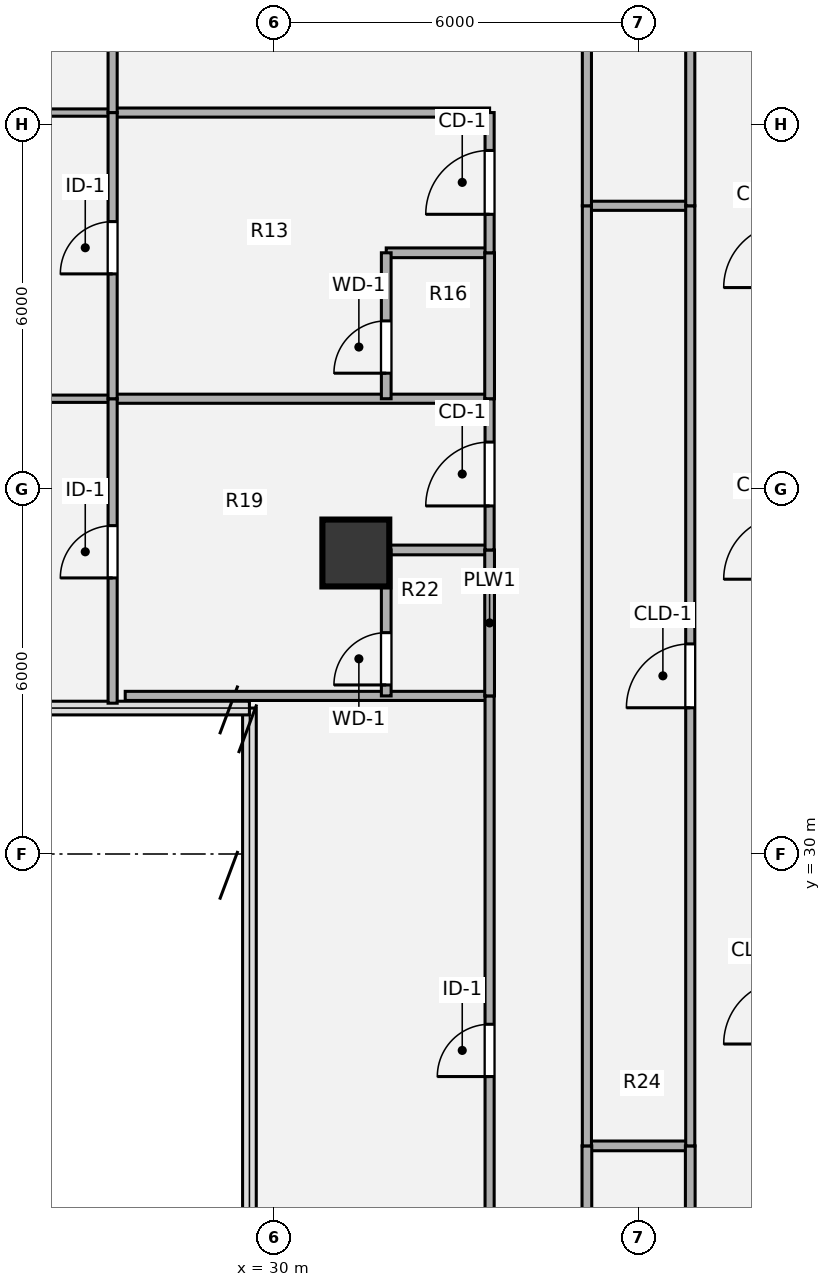
"""IFC4 building model, lengths in metres.
Left out: names, types, materials, properties, quantities, classifications, styles, units other than length and angle.
Written with IfcOpenShell. Run it as: python <this file> out.ifc"""

import sys

from ifc_helpers import new_model, si_unit, direction, frame, frame_2d, origin, origin_2d, place, context, subcontext, project, spatial, rectangle, hollow_circle, extrude, source, transform, mapped, element, fill, save


model = new_model("IFC4")
c1 = context("Model", 3, precision=1e-05, world=origin(), true_north=direction((0.0, 1.0)))
c2 = subcontext(c1, "Body", "Model", "MODEL_VIEW")
j1 = project(units=[si_unit("LENGTHUNIT", "METRE"), si_unit("PLANEANGLEUNIT", "RADIAN")], contexts=[c1])
p1 = place(None, origin())
s1 = spatial("IfcSite", under=j1, at=p1, CompositionType="ELEMENT")
p2 = place(p1, origin())
s2 = spatial("IfcBuilding", under=s1, at=p2, CompositionType="ELEMENT")
p3 = place(p2, frame((0.0, 0.0, 198.0)))
s3 = spatial("IfcBuildingStorey", under=s2, at=p3, CompositionType="ELEMENT", Elevation=198.0)
m1 = source(origin(), c2, "Body", "SweptSolid", [
    extrude(hollow_circle(Radius=0.55, WallThickness=0.04, at=origin_2d()), origin(), (0.0, 0.0, 1.0), 3.78),
])
p4 = place(p3, frame((31.35, 34.95, 0.0), z_axis=(0.0, 0.0, 1.0), x_axis=(1.0, 0.0, 0.0)))
e1 = element("IfcColumn", 1, at=p4, inside=s3, PredefinedType="COLUMN", context=c2, shape_type="MappedRepresentation", body=[
    mapped(m1, transform((0.0, 0.0, 0.0), x_axis=(1.0, 0.0, 0.0), y_axis=(0.0, 1.0, 0.0), z_axis=(0.0, 0.0, 1.0), scale=1.0)),
])
p5 = place(p3, frame((35.15, 25.2, 0.0), z_axis=(0.0, 0.0, 1.0), x_axis=(1.0, 0.0, 0.0)))
e2 = element("IfcWall", 2, at=p5, inside=s3, PredefinedType="PLUMBINGWALL", context=c2, shape_type="SweptSolid", body=[
    extrude(rectangle(XDim=1.7, YDim=0.16, at=frame_2d((0.85, 0.0))), origin(), (0.0, 0.0, 1.0), 3.5),
])
p6 = place(p3, frame((27.557, 32.6, 0.0), z_axis=(0.0, 0.0, 1.0), x_axis=(1.0, 0.0, 0.0)))
e3 = element("IfcWall", 3, at=p6, inside=s3, PredefinedType="PARTITIONING", context=c2, shape_type="SweptSolid", body=[
    extrude(rectangle(XDim=5.993, YDim=0.15, at=frame_2d((2.997, 0.0))), origin(), (0.0, 0.0, 1.0), 3.5),
])
p7 = place(p3, frame((31.85, 35.0, 0.0), z_axis=(0.0, 0.0, 1.0), x_axis=(1.0, 0.0, 0.0)))
e4 = element("IfcWall", 4, at=p7, inside=s3, PredefinedType="PLUMBINGWALL", context=c2, shape_type="SweptSolid", body=[
    extrude(rectangle(XDim=1.7, YDim=0.16, at=frame_2d((0.85, 0.0))), origin(), (0.0, 0.0, 1.0), 2.903),
])
p8 = place(p3, frame((15.88, 37.487, 0.0), z_axis=(0.0, 0.0, 1.0), x_axis=(1.0, 0.0, 0.0)))
e5 = element("IfcWall", 5, at=p8, inside=s3, PredefinedType="PARTITIONING", context=c2, shape_type="SweptSolid", body=[
    extrude(rectangle(XDim=11.47, YDim=0.12, at=frame_2d((5.735, 0.0))), origin(), (0.0, 0.0, 1.0), 3.055),
])
p9 = place(p3, frame((27.35, 37.487, 0.0), z_axis=(0.0, 0.0, 1.0), x_axis=(1.0, 0.0, 0.0)))
e6 = element("IfcWall", 6, at=p9, inside=s3, PredefinedType="PARTITIONING", context=c2, shape_type="SweptSolid", body=[
    extrude(rectangle(XDim=6.2, YDim=0.15, at=frame_2d((3.1, 0.0))), origin(), (0.0, 0.0, 1.0), 3.055),
])
p10 = place(p3, frame((31.85, 39.887, 0.0), z_axis=(0.0, 0.0, 1.0), x_axis=(1.0, 0.0, 0.0)))
e7 = element("IfcWall", 7, at=p10, inside=s3, PredefinedType="PLUMBINGWALL", context=c2, shape_type="SweptSolid", body=[
    extrude(rectangle(XDim=1.7, YDim=0.16, at=frame_2d((0.85, 0.0))), origin(), (0.0, 0.0, 1.0), 3.259),
])
p11 = place(p3, frame((35.15, 40.66, 0.0), z_axis=(0.0, 0.0, 1.0), x_axis=(1.0, 0.0, 0.0)))
e8 = element("IfcWall", 8, at=p11, inside=s3, PredefinedType="PARTITIONING", context=c2, shape_type="SweptSolid", body=[
    extrude(rectangle(XDim=1.7, YDim=0.15, at=frame_2d((0.85, 0.0))), origin(), (0.0, 0.0, 1.0), 3.259),
])
p12 = place(p3, frame((15.88, 42.193, 0.0), z_axis=(0.0, 0.0, 1.0), x_axis=(1.0, 0.0, 0.0)))
e9 = element("IfcWall", 9, at=p12, inside=s3, PredefinedType="PARTITIONING", context=c2, shape_type="SweptSolid", body=[
    extrude(rectangle(XDim=11.47, YDim=0.12, at=frame_2d((5.735, 0.0))), origin(), (0.0, 0.0, 1.0), 2.982),
])
p13 = place(p3, frame((27.35, 42.193, 0.0), z_axis=(0.0, 0.0, 1.0), x_axis=(1.0, 0.0, 0.0)))
e10 = element("IfcWall", 10, at=p13, inside=s3, PredefinedType="PARTITIONING", context=c2, shape_type="SweptSolid", body=[
    extrude(rectangle(XDim=6.2, YDim=0.15, at=frame_2d((3.1, 0.0))), origin(), (0.0, 0.0, 1.0), 2.982),
])
p14 = place(p3, frame((27.35, 32.48, 0.0), z_axis=(0.0, 0.0, 1.0), x_axis=(0.0, 1.0, 0.0)))
e11 = element("IfcWall", 11, at=p14, inside=s3, PredefinedType="PARTITIONING", context=c2, shape_type="SweptSolid", body=[
    extrude(rectangle(XDim=5.007, YDim=0.15, at=frame_2d((2.503, 0.0))), origin(), (0.0, 0.0, 1.0), 3.5),
])
p15 = place(p14, frame((2.06, 0.0, 0.0)))
e12 = element("IfcOpeningElement", 12, at=p15, cuts=e11, PredefinedType="OPENING", context=c2, shape_type="SweptSolid", body=[
    extrude(rectangle(XDim=0.86, YDim=2.1, at=origin_2d()), frame((0.43, 0.085, 1.05), z_axis=(0.0, -1.0, 0.0), x_axis=(1.0, 0.0, 0.0)), (0.0, 0.0, 1.0), 0.17),
])
p16 = place(p3, frame((27.35, 37.487, 0.0), z_axis=(0.0, 0.0, 1.0), x_axis=(0.0, 1.0, 0.0)))
e13 = element("IfcWall", 13, at=p16, inside=s3, PredefinedType="PARTITIONING", context=c2, shape_type="SweptSolid", body=[
    extrude(rectangle(XDim=4.706, YDim=0.15, at=frame_2d((2.353, 0.0))), origin(), (0.0, 0.0, 1.0), 3.5),
])
p17 = place(p16, frame((2.053, 0.0, 0.0)))
e14 = element("IfcOpeningElement", 14, at=p17, cuts=e13, PredefinedType="OPENING", context=c2, shape_type="SweptSolid", body=[
    extrude(rectangle(XDim=0.86, YDim=2.1, at=origin_2d()), frame((0.43, 0.085, 1.05), z_axis=(0.0, -1.0, 0.0), x_axis=(1.0, 0.0, 0.0)), (0.0, 0.0, 1.0), 0.17),
])
p18 = place(p3, frame((27.35, 42.193, 0.0), z_axis=(0.0, 0.0, 1.0), x_axis=(0.0, 1.0, 0.0)))
e15 = element("IfcWall", 15, at=p18, inside=s3, PredefinedType="PARTITIONING", context=c2, shape_type="SweptSolid", body=[
    extrude(rectangle(XDim=4.344, YDim=0.15, at=frame_2d((2.172, 0.0))), origin(), (0.0, 0.0, 1.0), 3.5),
])
p19 = place(p18, frame((1.847, 0.0, 0.0)))
e16 = element("IfcOpeningElement", 16, at=p19, cuts=e15, PredefinedType="OPENING", context=c2, shape_type="SweptSolid", body=[
    extrude(rectangle(XDim=0.86, YDim=2.1, at=origin_2d()), frame((0.43, 0.085, 1.05), z_axis=(0.0, -1.0, 0.0), x_axis=(1.0, 0.0, 0.0)), (0.0, 0.0, 1.0), 0.17),
])
p20 = place(p3, frame((31.85, 32.6, 0.0), z_axis=(0.0, 0.0, 1.0), x_axis=(0.0, 1.0, 0.0)))
e17 = element("IfcWall", 17, at=p20, inside=s3, PredefinedType="PLUMBINGWALL", context=c2, shape_type="SweptSolid", body=[
    extrude(rectangle(XDim=2.4, YDim=0.16, at=frame_2d((1.2, 0.0))), origin(), (0.0, 0.0, 1.0), 3.5),
])
p21 = place(p20, frame((0.18, 0.0, 0.0)))
e18 = element("IfcOpeningElement", 18, at=p21, cuts=e17, PredefinedType="OPENING", context=c2, shape_type="SweptSolid", body=[
    extrude(rectangle(XDim=0.86, YDim=2.1, at=origin_2d()), frame((0.43, 0.09, 1.05), z_axis=(0.0, -1.0, 0.0), x_axis=(1.0, 0.0, 0.0)), (0.0, 0.0, 1.0), 0.18),
])
p22 = place(p3, frame((31.85, 37.487, 0.0), z_axis=(0.0, 0.0, 1.0), x_axis=(0.0, 1.0, 0.0)))
e19 = element("IfcWall", 19, at=p22, inside=s3, PredefinedType="PLUMBINGWALL", context=c2, shape_type="SweptSolid", body=[
    extrude(rectangle(XDim=2.4, YDim=0.16, at=frame_2d((1.2, 0.0))), origin(), (0.0, 0.0, 1.0), 3.5),
])
p23 = place(p22, frame((0.42, 0.0, 0.0)))
e20 = element("IfcOpeningElement", 20, at=p23, cuts=e19, PredefinedType="OPENING", context=c2, shape_type="SweptSolid", body=[
    extrude(rectangle(XDim=0.86, YDim=2.1, at=origin_2d()), frame((0.43, 0.09, 1.05), z_axis=(0.0, -1.0, 0.0), x_axis=(1.0, 0.0, 0.0)), (0.0, 0.0, 1.0), 0.18),
])
p24 = place(p3, frame((33.55, 21.2, 0.0), z_axis=(0.0, 0.0, 1.0), x_axis=(0.0, 1.0, 0.0)))
e21 = element("IfcWall", 21, at=p24, inside=s3, PredefinedType="PARTITIONING", context=c2, shape_type="SweptSolid", body=[
    extrude(rectangle(XDim=11.4, YDim=0.15, at=frame_2d((5.7, 0.0))), origin(), (0.0, 0.0, 1.0), 3.5),
])
p25 = place(p24, frame((5.14, 0.0, 0.0)))
e22 = element("IfcOpeningElement", 22, at=p25, cuts=e21, PredefinedType="OPENING", context=c2, shape_type="SweptSolid", body=[
    extrude(rectangle(XDim=0.86, YDim=2.1, at=origin_2d()), frame((0.43, 0.085, 1.05), z_axis=(0.0, -1.0, 0.0), x_axis=(1.0, 0.0, 0.0)), (0.0, 0.0, 1.0), 0.17),
])
p26 = place(p3, frame((33.55, 32.6, 0.0), z_axis=(0.0, 0.0, 1.0), x_axis=(0.0, 1.0, 0.0)))
e23 = element("IfcWall", 23, at=p26, inside=s3, PredefinedType="PLUMBINGWALL", context=c2, shape_type="SweptSolid", body=[
    extrude(rectangle(XDim=2.4, YDim=0.16, at=frame_2d((1.2, 0.0))), origin(), (0.0, 0.0, 1.0), 3.5),
])
p27 = place(p3, frame((33.55, 35.0, 0.0), z_axis=(0.0, 0.0, 1.0), x_axis=(0.0, 1.0, 0.0)))
e24 = element("IfcWall", 24, at=p27, inside=s3, PredefinedType="PARTITIONING", context=c2, shape_type="SweptSolid", body=[
    extrude(rectangle(XDim=2.487, YDim=0.15, at=frame_2d((1.244, 0.0))), origin(), (0.0, 0.0, 1.0), 3.5),
])
p28 = place(p27, frame((0.724, 0.0, 0.0)))
e25 = element("IfcOpeningElement", 25, at=p28, cuts=e24, PredefinedType="OPENING", context=c2, shape_type="SweptSolid", body=[
    extrude(rectangle(XDim=1.05, YDim=2.1, at=origin_2d()), frame((0.525, 0.085, 1.05), z_axis=(0.0, -1.0, 0.0), x_axis=(1.0, 0.0, 0.0)), (0.0, 0.0, 1.0), 0.17),
])
p29 = place(p3, frame((33.55, 37.487, 0.0), z_axis=(0.0, 0.0, 1.0), x_axis=(0.0, 1.0, 0.0)))
e26 = element("IfcWall", 26, at=p29, inside=s3, PredefinedType="PLUMBINGWALL", context=c2, shape_type="SweptSolid", body=[
    extrude(rectangle(XDim=2.4, YDim=0.16, at=frame_2d((1.2, 0.0))), origin(), (0.0, 0.0, 1.0), 3.5),
])
p30 = place(p3, frame((33.55, 39.887, 0.0), z_axis=(0.0, 0.0, 1.0), x_axis=(0.0, 1.0, 0.0)))
e27 = element("IfcWall", 27, at=p30, inside=s3, PredefinedType="PARTITIONING", context=c2, shape_type="SweptSolid", body=[
    extrude(rectangle(XDim=2.306, YDim=0.15, at=frame_2d((1.153, 0.0))), origin(), (0.0, 0.0, 1.0), 3.5),
])
p31 = place(p30, frame((0.633, 0.0, 0.0)))
e28 = element("IfcOpeningElement", 28, at=p31, cuts=e27, PredefinedType="OPENING", context=c2, shape_type="SweptSolid", body=[
    extrude(rectangle(XDim=1.05, YDim=2.1, at=origin_2d()), frame((0.525, 0.085, 1.05), z_axis=(0.0, -1.0, 0.0), x_axis=(1.0, 0.0, 0.0)), (0.0, 0.0, 1.0), 0.17),
])
p32 = place(p3, frame((35.15, 20.2, 0.0), z_axis=(0.0, 0.0, 1.0), x_axis=(0.0, 1.0, 0.0)))
e29 = element("IfcWall", 29, at=p32, inside=s3, PredefinedType="PLUMBINGWALL", context=c2, shape_type="SweptSolid", body=[
    extrude(rectangle(XDim=5.0, YDim=0.16, at=frame_2d((2.5, 0.0))), origin(), (0.0, 0.0, 1.0), 3.5),
])
p33 = place(p32, frame((2.07, 0.0, 0.0)))
e30 = element("IfcOpeningElement", 30, at=p33, cuts=e29, PredefinedType="OPENING", context=c2, shape_type="SweptSolid", body=[
    extrude(rectangle(XDim=0.86, YDim=2.1, at=origin_2d()), frame((0.43, 0.09, 1.05), z_axis=(0.0, -1.0, 0.0), x_axis=(1.0, 0.0, 0.0)), (0.0, 0.0, 1.0), 0.18),
])
p34 = place(p3, frame((35.15, 25.2, 0.0), z_axis=(0.0, 0.0, 1.0), x_axis=(0.0, 1.0, 0.0)))
e31 = element("IfcWall", 31, at=p34, inside=s3, PredefinedType="PARTITIONING", context=c2, shape_type="SweptSolid", body=[
    extrude(rectangle(XDim=15.46, YDim=0.15, at=frame_2d((7.73, 0.0))), origin(), (0.0, 0.0, 1.0), 3.5),
])
p35 = place(p3, frame((35.15, 40.66, 0.0), z_axis=(0.0, 0.0, 1.0), x_axis=(0.0, 1.0, 0.0)))
e32 = element("IfcWall", 32, at=p35, inside=s3, PredefinedType="PARTITIONING", context=c2, shape_type="SweptSolid", body=[
    extrude(rectangle(XDim=10.54, YDim=0.15, at=frame_2d((5.27, 0.0))), origin(), (0.0, 0.0, 1.0), 3.5),
])
p36 = place(p35, frame((4.81, 0.0, 0.0)))
e33 = element("IfcOpeningElement", 33, at=p36, cuts=e32, PredefinedType="OPENING", context=c2, shape_type="SweptSolid", body=[
    extrude(rectangle(XDim=0.86, YDim=2.1, at=origin_2d()), frame((0.43, 0.085, 1.05), z_axis=(0.0, -1.0, 0.0), x_axis=(1.0, 0.0, 0.0)), (0.0, 0.0, 1.0), 0.17),
])
p37 = place(p3, frame((36.85, 20.2, 0.0), z_axis=(0.0, 0.0, 1.0), x_axis=(0.0, 1.0, 0.0)))
e34 = element("IfcWall", 34, at=p37, inside=s3, PredefinedType="PLUMBINGWALL", context=c2, shape_type="SweptSolid", body=[
    extrude(rectangle(XDim=5.0, YDim=0.16, at=frame_2d((2.5, 0.0))), origin(), (0.0, 0.0, 1.0), 3.5),
])
p38 = place(p3, frame((36.85, 25.2, 0.0), z_axis=(0.0, 0.0, 1.0), x_axis=(0.0, 1.0, 0.0)))
e35 = element("IfcWall", 35, at=p38, inside=s3, PredefinedType="PARTITIONING", context=c2, shape_type="SweptSolid", body=[
    extrude(rectangle(XDim=15.46, YDim=0.15, at=frame_2d((7.73, 0.0))), origin(), (0.0, 0.0, 1.0), 3.5),
])
p39 = place(p38, frame((7.205, 0.0, 0.0)))
e36 = element("IfcOpeningElement", 36, at=p39, cuts=e35, PredefinedType="OPENING", context=c2, shape_type="SweptSolid", body=[
    extrude(rectangle(XDim=1.05, YDim=2.1, at=origin_2d()), frame((0.525, 0.085, 1.05), z_axis=(0.0, -1.0, 0.0), x_axis=(1.0, 0.0, 0.0)), (0.0, 0.0, 1.0), 0.17),
])
p40 = place(p3, frame((36.85, 40.66, 0.0), z_axis=(0.0, 0.0, 1.0), x_axis=(0.0, 1.0, 0.0)))
e37 = element("IfcWall", 37, at=p40, inside=s3, PredefinedType="PARTITIONING", context=c2, shape_type="SweptSolid", body=[
    extrude(rectangle(XDim=10.54, YDim=0.15, at=frame_2d((5.27, 0.0))), origin(), (0.0, 0.0, 1.0), 3.5),
])
m2 = source(origin(), c2, "Body", "SweptSolid", [
    extrude(rectangle(XDim=0.86, YDim=2.1, at=origin_2d()), frame((0.43, 0.025, 1.05), z_axis=(0.0, -1.0, 0.0), x_axis=(1.0, 0.0, 0.0)), (0.0, 0.0, 1.0), 0.05),
])
p41 = place(p15, origin())
e38 = element("IfcDoor", 38, at=p41, inside=s3, OperationType="SINGLE_SWING_LEFT", PredefinedType="DOOR", context=c2, shape_type="MappedRepresentation", body=[
    mapped(m2, transform((0.0, 0.0, 0.0), x_axis=(1.0, 0.0, 0.0), y_axis=(0.0, 1.0, 0.0), z_axis=(0.0, 0.0, 1.0), scale=1.0)),
])
fill(e12, e38)
p42 = place(p17, origin())
e39 = element("IfcDoor", 39, at=p42, inside=s3, OperationType="SINGLE_SWING_LEFT", PredefinedType="DOOR", context=c2, shape_type="MappedRepresentation", body=[
    mapped(m2, transform((0.0, 0.0, 0.0), x_axis=(1.0, 0.0, 0.0), y_axis=(0.0, 1.0, 0.0), z_axis=(0.0, 0.0, 1.0), scale=1.0)),
])
fill(e14, e39)
m3 = source(origin(), c2, "Body", "SweptSolid", [
    extrude(rectangle(XDim=0.86, YDim=2.1, at=origin_2d()), frame((0.43, 0.025, 1.05), z_axis=(0.0, -1.0, 0.0), x_axis=(1.0, 0.0, 0.0)), (0.0, 0.0, 1.0), 0.05),
])
p43 = place(p21, origin())
e40 = element("IfcDoor", 40, at=p43, inside=s3, OperationType="SINGLE_SWING_LEFT", PredefinedType="DOOR", context=c2, shape_type="MappedRepresentation", body=[
    mapped(m3, transform((0.0, 0.0, 0.0), x_axis=(1.0, 0.0, 0.0), y_axis=(0.0, 1.0, 0.0), z_axis=(0.0, 0.0, 1.0), scale=1.0)),
])
fill(e18, e40)
p44 = place(p23, origin())
e41 = element("IfcDoor", 41, at=p44, inside=s3, OperationType="SINGLE_SWING_LEFT", PredefinedType="DOOR", context=c2, shape_type="MappedRepresentation", body=[
    mapped(m3, transform((0.0, 0.0, 0.0), x_axis=(1.0, 0.0, 0.0), y_axis=(0.0, 1.0, 0.0), z_axis=(0.0, 0.0, 1.0), scale=1.0)),
])
fill(e20, e41)
p45 = place(p25, origin())
e42 = element("IfcDoor", 42, at=p45, inside=s3, OperationType="SINGLE_SWING_LEFT", PredefinedType="DOOR", context=c2, shape_type="MappedRepresentation", body=[
    mapped(m2, transform((0.0, 0.0, 0.0), x_axis=(1.0, 0.0, 0.0), y_axis=(0.0, 1.0, 0.0), z_axis=(0.0, 0.0, 1.0), scale=1.0)),
])
fill(e22, e42)
m4 = source(origin(), c2, "Body", "SweptSolid", [
    extrude(rectangle(XDim=1.05, YDim=2.1, at=origin_2d()), frame((0.525, 0.025, 1.05), z_axis=(0.0, -1.0, 0.0), x_axis=(1.0, 0.0, 0.0)), (0.0, 0.0, 1.0), 0.05),
])
p46 = place(p28, origin())
e43 = element("IfcDoor", 43, at=p46, inside=s3, OperationType="SINGLE_SWING_LEFT", PredefinedType="DOOR", context=c2, shape_type="MappedRepresentation", body=[
    mapped(m4, transform((0.0, 0.0, 0.0), x_axis=(1.0, 0.0, 0.0), y_axis=(0.0, 1.0, 0.0), z_axis=(0.0, 0.0, 1.0), scale=1.0)),
])
fill(e25, e43)
p47 = place(p31, origin())
e44 = element("IfcDoor", 44, at=p47, inside=s3, OperationType="SINGLE_SWING_LEFT", PredefinedType="DOOR", context=c2, shape_type="MappedRepresentation", body=[
    mapped(m4, transform((0.0, 0.0, 0.0), x_axis=(1.0, 0.0, 0.0), y_axis=(0.0, 1.0, 0.0), z_axis=(0.0, 0.0, 1.0), scale=1.0)),
])
fill(e28, e44)
m5 = source(origin(), c2, "Body", "SweptSolid", [
    extrude(rectangle(XDim=1.05, YDim=2.1, at=origin_2d()), frame((0.525, 0.025, 1.05), z_axis=(0.0, -1.0, 0.0), x_axis=(1.0, 0.0, 0.0)), (0.0, 0.0, 1.0), 0.05),
])
p48 = place(p39, origin())
e45 = element("IfcDoor", 45, at=p48, inside=s3, OperationType="SINGLE_SWING_LEFT", PredefinedType="DOOR", context=c2, shape_type="MappedRepresentation", body=[
    mapped(m5, transform((0.0, 0.0, 0.0), x_axis=(1.0, 0.0, 0.0), y_axis=(0.0, 1.0, 0.0), z_axis=(0.0, 0.0, 1.0), scale=1.0)),
])
fill(e36, e45)
save(model, sys.argv[1])
